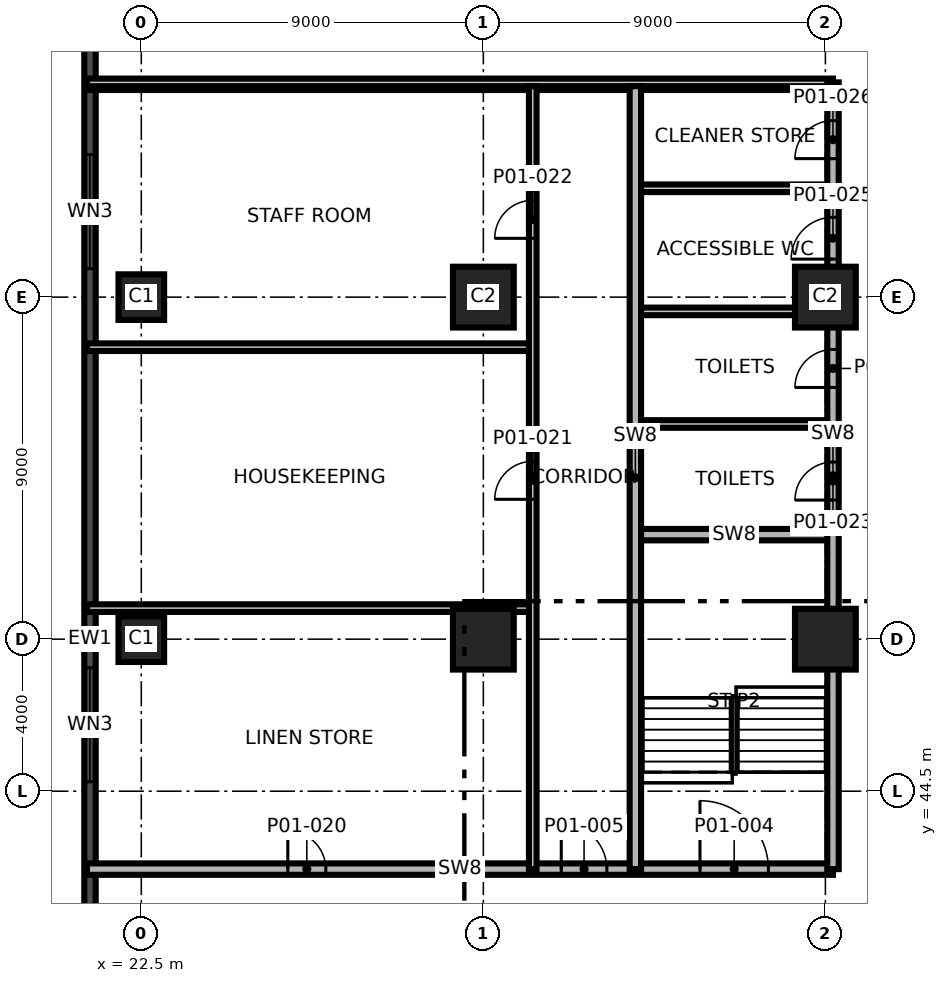
"""IFC4 building model, lengths in metres.
Left out: names, types, materials, properties, quantities, classifications, styles, units other than length and angle.
Written with IfcOpenShell. Run it as: python <this file> out.ifc"""

import sys

from ifc_helpers import new_model, si_unit, direction, frame, frame_2d, origin, origin_2d, place, context, subcontext, project, spatial, rectangle, extrude, element, fill, save


model = new_model("IFC4")
c1 = context("Model", 3, precision=1e-05, world=origin(), true_north=direction((0.0, 1.0)))
c2 = subcontext(c1, "Body", "Model", "MODEL_VIEW")
j1 = project(units=[si_unit("LENGTHUNIT", "METRE"), si_unit("PLANEANGLEUNIT", "RADIAN")], contexts=[c1])
p1 = place(None, origin())
s1 = spatial("IfcSite", under=j1, at=p1, CompositionType="ELEMENT")
p2 = place(p1, origin())
s2 = spatial("IfcBuilding", under=s1, at=p2, CompositionType="ELEMENT")
p3 = place(p2, frame((0.0, 0.0, 8.0)))
s3 = spatial("IfcBuildingStorey", under=s2, at=p3, CompositionType="ELEMENT", Elevation=8.0)
p4 = place(p3, frame((22.5, 48.5, 0.0), z_axis=(0.0, 0.0, 1.0), x_axis=(1.0, 0.0, 0.0)))
e1 = element("IfcColumn", 1, at=p4, inside=s3, PredefinedType="COLUMN", context=c2, shape_type="SweptSolid", body=[
    extrude(rectangle(XDim=1.2, YDim=1.2, at=origin_2d()), origin(), (0.0, 0.0, 1.0), 5.5),
])
for number, where, z_axis, x_axis in (
    (2, (31.5, 48.5, 0.0), (0.0, 0.0, 1.0), (1.0, 0.0, 0.0)),
    (3, (40.5, 48.5, 0.0), (0.0, 0.0, 1.0), (1.0, 0.0, 0.0)),
):
    element("IfcColumn", number, at=place(p3, frame(where, z_axis=z_axis, x_axis=x_axis)), inside=s3, PredefinedType="COLUMN", context=c2, shape_type="SweptSolid", body=[
        extrude(rectangle(XDim=1.6, YDim=1.6, at=origin_2d()), origin(), (0.0, 0.0, 1.0), 5.5),
    ])
p5 = place(p3, frame((22.5, 57.5, 0.0), z_axis=(0.0, 0.0, 1.0), x_axis=(1.0, 0.0, 0.0)))
e4 = element("IfcColumn", 4, at=p5, inside=s3, PredefinedType="COLUMN", context=c2, shape_type="SweptSolid", body=[
    extrude(rectangle(XDim=1.2, YDim=1.2, at=origin_2d()), origin(), (0.0, 0.0, 1.0), 5.5),
])
for number, where, z_axis, x_axis in (
    (5, (31.5, 57.5, 0.0), (0.0, 0.0, 1.0), (1.0, 0.0, 0.0)),
    (6, (40.5, 57.5, 0.0), (0.0, 0.0, 1.0), (1.0, 0.0, 0.0)),
):
    element("IfcColumn", number, at=place(p3, frame(where, z_axis=z_axis, x_axis=x_axis)), inside=s3, PredefinedType="COLUMN", context=c2, shape_type="SweptSolid", body=[
        extrude(rectangle(XDim=1.6, YDim=1.6, at=origin_2d()), origin(), (0.0, 0.0, 1.0), 5.5),
    ])
p6 = place(p3, frame((21.15, 79.952, 0.0), z_axis=(0.0, 0.0, 1.0), x_axis=(0.0, -1.0, 0.0)))
e7 = element("IfcWall", 7, at=p6, inside=s3, PredefinedType="SOLIDWALL", context=c2, shape_type="SweptSolid", body=[
    extrude(rectangle(XDim=62.88, YDim=0.3, at=frame_2d((31.44, 0.0))), origin(), (0.0, 0.0, 1.0), 5.2),
])
p7 = place(p6, frame((0.726, 0.0, 0.9)))
e8 = element("IfcOpeningElement", 8, at=p7, cuts=e7, PredefinedType="OPENING", context=c2, shape_type="SweptSolid", body=[
    extrude(rectangle(XDim=3.0, YDim=2.4, at=frame_2d((1.5, 1.2))), frame((0.0, 0.16, 0.0), z_axis=(0.0, -1.0, 0.0), x_axis=(1.0, 0.0, 0.0)), (0.0, 0.0, 1.0), 0.32),
])
p8 = place(p6, frame((5.202, 0.0, 0.9)))
e9 = element("IfcOpeningElement", 9, at=p8, cuts=e7, PredefinedType="OPENING", context=c2, shape_type="SweptSolid", body=[
    extrude(rectangle(XDim=3.0, YDim=2.4, at=frame_2d((1.5, 1.2))), frame((0.0, 0.16, 0.0), z_axis=(0.0, -1.0, 0.0), x_axis=(1.0, 0.0, 0.0)), (0.0, 0.0, 1.0), 0.32),
])
p9 = place(p6, frame((9.702, 0.0, 0.9)))
e10 = element("IfcOpeningElement", 10, at=p9, cuts=e7, PredefinedType="OPENING", context=c2, shape_type="SweptSolid", body=[
    extrude(rectangle(XDim=3.0, YDim=2.4, at=frame_2d((1.5, 1.2))), frame((0.0, 0.16, 0.0), z_axis=(0.0, -1.0, 0.0), x_axis=(1.0, 0.0, 0.0)), (0.0, 0.0, 1.0), 0.32),
])
p10 = place(p6, frame((18.702, 0.0, 0.9)))
e11 = element("IfcOpeningElement", 11, at=p10, cuts=e7, PredefinedType="OPENING", context=c2, shape_type="SweptSolid", body=[
    extrude(rectangle(XDim=3.0, YDim=2.4, at=frame_2d((1.5, 1.2))), frame((0.0, 0.16, 0.0), z_axis=(0.0, -1.0, 0.0), x_axis=(1.0, 0.0, 0.0)), (0.0, 0.0, 1.0), 0.32),
])
p11 = place(p6, frame((32.202, 0.0, 0.9)))
e12 = element("IfcOpeningElement", 12, at=p11, cuts=e7, PredefinedType="OPENING", context=c2, shape_type="SweptSolid", body=[
    extrude(rectangle(XDim=3.0, YDim=2.4, at=frame_2d((1.5, 1.2))), frame((0.0, 0.16, 0.0), z_axis=(0.0, -1.0, 0.0), x_axis=(1.0, 0.0, 0.0)), (0.0, 0.0, 1.0), 0.32),
])
p12 = place(p6, frame((41.202, 0.0, 0.9)))
e13 = element("IfcOpeningElement", 13, at=p12, cuts=e7, PredefinedType="OPENING", context=c2, shape_type="SweptSolid", body=[
    extrude(rectangle(XDim=3.0, YDim=2.4, at=frame_2d((1.5, 1.2))), frame((0.0, 0.16, 0.0), z_axis=(0.0, -1.0, 0.0), x_axis=(1.0, 0.0, 0.0)), (0.0, 0.0, 1.0), 0.32),
])
p13 = place(p6, frame((45.702, 0.0, 0.9)))
e14 = element("IfcOpeningElement", 14, at=p13, cuts=e7, PredefinedType="OPENING", context=c2, shape_type="SweptSolid", body=[
    extrude(rectangle(XDim=3.0, YDim=2.4, at=frame_2d((1.5, 1.2))), frame((0.0, 0.16, 0.0), z_axis=(0.0, -1.0, 0.0), x_axis=(1.0, 0.0, 0.0)), (0.0, 0.0, 1.0), 0.32),
])
p14 = place(p6, frame((50.202, 0.0, 0.9)))
e15 = element("IfcOpeningElement", 15, at=p14, cuts=e7, PredefinedType="OPENING", context=c2, shape_type="SweptSolid", body=[
    extrude(rectangle(XDim=3.0, YDim=2.4, at=frame_2d((1.5, 1.2))), frame((0.0, 0.16, 0.0), z_axis=(0.0, -1.0, 0.0), x_axis=(1.0, 0.0, 0.0)), (0.0, 0.0, 1.0), 0.32),
])
p15 = place(p6, frame((54.702, 0.0, 0.9)))
e16 = element("IfcOpeningElement", 16, at=p15, cuts=e7, PredefinedType="OPENING", context=c2, shape_type="SweptSolid", body=[
    extrude(rectangle(XDim=3.0, YDim=2.4, at=frame_2d((1.5, 1.2))), frame((0.0, 0.16, 0.0), z_axis=(0.0, -1.0, 0.0), x_axis=(1.0, 0.0, 0.0)), (0.0, 0.0, 1.0), 0.32),
])
p16 = place(p6, frame((59.226, 0.0, 0.9)))
e17 = element("IfcOpeningElement", 17, at=p16, cuts=e7, PredefinedType="OPENING", context=c2, shape_type="SweptSolid", body=[
    extrude(rectangle(XDim=3.0, YDim=2.4, at=frame_2d((1.5, 1.2))), frame((0.0, 0.16, 0.0), z_axis=(0.0, -1.0, 0.0), x_axis=(1.0, 0.0, 0.0)), (0.0, 0.0, 1.0), 0.32),
])
p17 = place(p3, frame((21.07, 42.45, 0.0), z_axis=(0.0, 0.0, 1.0), x_axis=(1.0, 0.0, 0.0)))
e18 = element("IfcWall", 18, at=p17, inside=s3, PredefinedType="SHEAR", context=c2, shape_type="SweptSolid", body=[
    extrude(rectangle(XDim=19.63, YDim=0.3, at=frame_2d((9.815, 0.0))), origin(), (0.0, 0.0, 1.0), 5.2),
])
p18 = place(p17, frame((16.13, 0.0, 0.0)))
e19 = element("IfcOpeningElement", 19, at=p18, cuts=e18, PredefinedType="OPENING", context=c2, shape_type="SweptSolid", body=[
    extrude(rectangle(XDim=1.8, YDim=2.1, at=frame_2d((0.9, 1.05))), frame((0.0, 0.16, 0.0), z_axis=(0.0, -1.0, 0.0), x_axis=(1.0, 0.0, 0.0)), (0.0, 0.0, 1.0), 0.32),
])
p19 = place(p17, frame((12.48, 0.0, 0.0)))
e20 = element("IfcOpeningElement", 20, at=p19, cuts=e18, PredefinedType="OPENING", context=c2, shape_type="SweptSolid", body=[
    extrude(rectangle(XDim=1.2, YDim=2.1, at=frame_2d((0.6, 1.05))), frame((0.0, 0.16, 0.0), z_axis=(0.0, -1.0, 0.0), x_axis=(1.0, 0.0, 0.0)), (0.0, 0.0, 1.0), 0.32),
])
p20 = place(p17, frame((5.285, 0.0, 0.0)))
e21 = element("IfcOpeningElement", 21, at=p20, cuts=e18, PredefinedType="OPENING", context=c2, shape_type="SweptSolid", body=[
    extrude(rectangle(XDim=1.0, YDim=2.1, at=frame_2d((0.5, 1.05))), frame((0.0, 0.16, 0.0), z_axis=(0.0, -1.0, 0.0), x_axis=(1.0, 0.0, 0.0)), (0.0, 0.0, 1.0), 0.32),
])
p21 = place(p3, frame((21.07, 49.317, 0.0), z_axis=(0.0, 0.0, 1.0), x_axis=(1.0, 0.0, 0.0)))
e22 = element("IfcWall", 22, at=p21, inside=s3, PredefinedType="PARTITIONING", context=c2, shape_type="SweptSolid", body=[
    extrude(rectangle(XDim=11.73, YDim=0.2, at=frame_2d((5.865, 0.0))), origin(), (0.0, 0.0, 1.0), 5.2),
])
p22 = place(p3, frame((35.5, 51.25, 0.0), z_axis=(0.0, 0.0, 1.0), x_axis=(1.0, 0.0, 0.0)))
e23 = element("IfcWall", 23, at=p22, inside=s3, PredefinedType="SHEAR", context=c2, shape_type="SweptSolid", body=[
    extrude(rectangle(XDim=5.2, YDim=0.3, at=frame_2d((2.6, 0.0))), origin(), (0.0, 0.0, 1.0), 5.2),
])
p23 = place(p3, frame((35.55, 54.162, 0.0), z_axis=(0.0, 0.0, 1.0), x_axis=(1.0, 0.0, 0.0)))
e24 = element("IfcWall", 24, at=p23, inside=s3, PredefinedType="PARTITIONING", context=c2, shape_type="SweptSolid", body=[
    extrude(rectangle(XDim=5.15, YDim=0.2, at=frame_2d((2.575, 0.0))), origin(), (0.0, 0.0, 1.0), 5.2),
])
p24 = place(p3, frame((21.07, 56.183, 0.0), z_axis=(0.0, 0.0, 1.0), x_axis=(1.0, 0.0, 0.0)))
e25 = element("IfcWall", 25, at=p24, inside=s3, PredefinedType="PARTITIONING", context=c2, shape_type="SweptSolid", body=[
    extrude(rectangle(XDim=11.73, YDim=0.2, at=frame_2d((5.865, 0.0))), origin(), (0.0, 0.0, 1.0), 5.2),
])
for number, where, z_axis, x_axis in (
    (26, (35.55, 57.125, 0.0), (0.0, 0.0, 1.0), (1.0, 0.0, 0.0)),
    (27, (35.55, 60.364, 0.0), (0.0, 0.0, 1.0), (1.0, 0.0, 0.0)),
):
    element("IfcWall", number, at=place(p3, frame(where, z_axis=z_axis, x_axis=x_axis)), inside=s3, PredefinedType="PARTITIONING", context=c2, shape_type="SweptSolid", body=[
        extrude(rectangle(XDim=5.15, YDim=0.2, at=frame_2d((2.575, 0.0))), origin(), (0.0, 0.0, 1.0), 5.2),
    ])
p25 = place(p3, frame((21.07, 63.05, 0.0), z_axis=(0.0, 0.0, 1.0), x_axis=(1.0, 0.0, 0.0)))
e28 = element("IfcWall", 28, at=p25, inside=s3, PredefinedType="PARTITIONING", context=c2, shape_type="SweptSolid", body=[
    extrude(rectangle(XDim=14.43, YDim=0.2, at=frame_2d((7.215, 0.0))), origin(), (0.0, 0.0, 1.0), 5.2),
])
p26 = place(p3, frame((35.55, 63.05, 0.0), z_axis=(0.0, 0.0, 1.0), x_axis=(1.0, 0.0, 0.0)))
e29 = element("IfcWall", 29, at=p26, inside=s3, PredefinedType="PARTITIONING", context=c2, shape_type="SweptSolid", body=[
    extrude(rectangle(XDim=5.15, YDim=0.2, at=frame_2d((2.575, 0.0))), origin(), (0.0, 0.0, 1.0), 5.2),
])
p27 = place(p3, frame((21.07, 63.15, 0.0), z_axis=(0.0, 0.0, 1.0), x_axis=(1.0, 0.0, 0.0)))
e30 = element("IfcWall", 30, at=p27, inside=s3, PredefinedType="PARTITIONING", context=c2, shape_type="SweptSolid", body=[
    extrude(rectangle(XDim=19.63, YDim=0.2, at=frame_2d((9.815, 0.0))), origin(), (0.0, 0.0, 1.0), 5.2),
])
p28 = place(p3, frame((32.8, 42.45, 0.0), z_axis=(0.0, 0.0, 1.0), x_axis=(0.0, 1.0, 0.0)))
e31 = element("IfcWall", 31, at=p28, inside=s3, PredefinedType="PARTITIONING", context=c2, shape_type="SweptSolid", body=[
    extrude(rectangle(XDim=20.6, YDim=0.2, at=frame_2d((10.3, 0.0))), origin(), (0.0, 0.0, 1.0), 5.2),
])
p29 = place(p28, frame((9.73, 0.0, 0.0)))
e32 = element("IfcOpeningElement", 32, at=p29, cuts=e31, PredefinedType="OPENING", context=c2, shape_type="SweptSolid", body=[
    extrude(rectangle(XDim=1.0, YDim=2.1, at=frame_2d((0.5, 1.05))), frame((0.0, 0.11, 0.0), z_axis=(0.0, -1.0, 0.0), x_axis=(1.0, 0.0, 0.0)), (0.0, 0.0, 1.0), 0.22),
])
p30 = place(p28, frame((16.597, 0.0, 0.0)))
e33 = element("IfcOpeningElement", 33, at=p30, cuts=e31, PredefinedType="OPENING", context=c2, shape_type="SweptSolid", body=[
    extrude(rectangle(XDim=1.0, YDim=2.1, at=frame_2d((0.5, 1.05))), frame((0.0, 0.11, 0.0), z_axis=(0.0, -1.0, 0.0), x_axis=(1.0, 0.0, 0.0)), (0.0, 0.0, 1.0), 0.22),
])
p31 = place(p3, frame((35.5, 42.45, 0.0), z_axis=(0.0, 0.0, 1.0), x_axis=(0.0, 1.0, 0.0)))
e34 = element("IfcWall", 34, at=p31, inside=s3, PredefinedType="SHEAR", context=c2, shape_type="SweptSolid", body=[
    extrude(rectangle(XDim=20.6, YDim=0.3, at=frame_2d((10.3, 0.0))), origin(), (0.0, 0.0, 1.0), 5.2),
])
p32 = place(p3, frame((40.7, 42.45, 0.0), z_axis=(0.0, 0.0, 1.0), x_axis=(0.0, 1.0, 0.0)))
e35 = element("IfcWall", 35, at=p32, inside=s3, PredefinedType="SHEAR", context=c2, shape_type="SweptSolid", body=[
    extrude(rectangle(XDim=20.7, YDim=0.3, at=frame_2d((10.35, 0.0))), origin(), (0.0, 0.0, 1.0), 5.2),
])
p33 = place(p32, frame((9.71, 0.0, 0.0)))
e36 = element("IfcOpeningElement", 36, at=p33, cuts=e35, PredefinedType="OPENING", context=c2, shape_type="SweptSolid", body=[
    extrude(rectangle(XDim=1.0, YDim=2.1, at=frame_2d((0.5, 1.05))), frame((0.0, 0.16, 0.0), z_axis=(0.0, -1.0, 0.0), x_axis=(1.0, 0.0, 0.0)), (0.0, 0.0, 1.0), 0.32),
])
p34 = place(p32, frame((12.673, 0.0, 0.0)))
e37 = element("IfcOpeningElement", 37, at=p34, cuts=e35, PredefinedType="OPENING", context=c2, shape_type="SweptSolid", body=[
    extrude(rectangle(XDim=1.0, YDim=2.1, at=frame_2d((0.5, 1.05))), frame((0.0, 0.16, 0.0), z_axis=(0.0, -1.0, 0.0), x_axis=(1.0, 0.0, 0.0)), (0.0, 0.0, 1.0), 0.32),
])
p35 = place(p32, frame((16.05, 0.0, 0.0)))
e38 = element("IfcOpeningElement", 38, at=p35, cuts=e35, PredefinedType="OPENING", context=c2, shape_type="SweptSolid", body=[
    extrude(rectangle(XDim=1.1, YDim=2.1, at=frame_2d((0.55, 1.05))), frame((0.0, 0.16, 0.0), z_axis=(0.0, -1.0, 0.0), x_axis=(1.0, 0.0, 0.0)), (0.0, 0.0, 1.0), 0.32),
])
p36 = place(p32, frame((18.694, 0.0, 0.0)))
e39 = element("IfcOpeningElement", 39, at=p36, cuts=e35, PredefinedType="OPENING", context=c2, shape_type="SweptSolid", body=[
    extrude(rectangle(XDim=1.0, YDim=2.1, at=frame_2d((0.5, 1.05))), frame((0.0, 0.16, 0.0), z_axis=(0.0, -1.0, 0.0), x_axis=(1.0, 0.0, 0.0)), (0.0, 0.0, 1.0), 0.32),
])
p37 = place(p10, origin())
e40 = element("IfcWindow", 40, at=p37, inside=s3, PartitioningType="SINGLE_PANEL", PredefinedType="WINDOW", context=c2, shape_type="SweptSolid", body=[
    extrude(rectangle(XDim=3.0, YDim=2.4, at=frame_2d((1.5, 1.2))), frame((0.0, 0.03, 0.0), z_axis=(0.0, -1.0, 0.0), x_axis=(1.0, 0.0, 0.0)), (0.0, 0.0, 1.0), 0.06),
])
fill(e11, e40)
p38 = place(p11, origin())
e41 = element("IfcWindow", 41, at=p38, inside=s3, PartitioningType="SINGLE_PANEL", PredefinedType="WINDOW", context=c2, shape_type="SweptSolid", body=[
    extrude(rectangle(XDim=3.0, YDim=2.4, at=frame_2d((1.5, 1.2))), frame((0.0, 0.03, 0.0), z_axis=(0.0, -1.0, 0.0), x_axis=(1.0, 0.0, 0.0)), (0.0, 0.0, 1.0), 0.06),
])
fill(e12, e41)
p39 = place(p18, origin())
e42 = element("IfcDoor", 42, at=p39, inside=s3, OperationType="SINGLE_SWING_RIGHT", PredefinedType="DOOR", context=c2, shape_type="SweptSolid", body=[
    extrude(rectangle(XDim=1.8, YDim=2.1, at=frame_2d((0.9, 1.05))), frame((0.0, 0.025, 0.0), z_axis=(0.0, -1.0, 0.0), x_axis=(1.0, 0.0, 0.0)), (0.0, 0.0, 1.0), 0.05),
])
fill(e19, e42)
p40 = place(p19, origin())
e43 = element("IfcDoor", 43, at=p40, inside=s3, OperationType="SINGLE_SWING_LEFT", PredefinedType="DOOR", context=c2, shape_type="SweptSolid", body=[
    extrude(rectangle(XDim=1.2, YDim=2.1, at=frame_2d((0.6, 1.05))), frame((0.0, 0.025, 0.0), z_axis=(0.0, -1.0, 0.0), x_axis=(1.0, 0.0, 0.0)), (0.0, 0.0, 1.0), 0.05),
])
fill(e20, e43)
p41 = place(p20, origin())
e44 = element("IfcDoor", 44, at=p41, inside=s3, OperationType="SINGLE_SWING_RIGHT", PredefinedType="DOOR", context=c2, shape_type="SweptSolid", body=[
    extrude(rectangle(XDim=1.0, YDim=2.1, at=frame_2d((0.5, 1.05))), frame((0.0, 0.025, 0.0), z_axis=(0.0, -1.0, 0.0), x_axis=(1.0, 0.0, 0.0)), (0.0, 0.0, 1.0), 0.05),
])
fill(e21, e44)
p42 = place(p29, origin())
e45 = element("IfcDoor", 45, at=p42, inside=s3, OperationType="SINGLE_SWING_LEFT", PredefinedType="DOOR", context=c2, shape_type="SweptSolid", body=[
    extrude(rectangle(XDim=1.0, YDim=2.1, at=frame_2d((0.5, 1.05))), frame((0.0, 0.025, 0.0), z_axis=(0.0, -1.0, 0.0), x_axis=(1.0, 0.0, 0.0)), (0.0, 0.0, 1.0), 0.05),
])
fill(e32, e45)
p43 = place(p30, origin())
e46 = element("IfcDoor", 46, at=p43, inside=s3, OperationType="SINGLE_SWING_RIGHT", PredefinedType="DOOR", context=c2, shape_type="SweptSolid", body=[
    extrude(rectangle(XDim=1.0, YDim=2.1, at=frame_2d((0.5, 1.05))), frame((0.0, 0.025, 0.0), z_axis=(0.0, -1.0, 0.0), x_axis=(1.0, 0.0, 0.0)), (0.0, 0.0, 1.0), 0.05),
])
fill(e33, e46)
p44 = place(p33, origin())
e47 = element("IfcDoor", 47, at=p44, inside=s3, OperationType="SINGLE_SWING_LEFT", PredefinedType="DOOR", context=c2, shape_type="SweptSolid", body=[
    extrude(rectangle(XDim=1.0, YDim=2.1, at=frame_2d((0.5, 1.05))), frame((0.0, 0.025, 0.0), z_axis=(0.0, -1.0, 0.0), x_axis=(1.0, 0.0, 0.0)), (0.0, 0.0, 1.0), 0.05),
])
fill(e36, e47)
p45 = place(p34, origin())
e48 = element("IfcDoor", 48, at=p45, inside=s3, OperationType="SINGLE_SWING_RIGHT", PredefinedType="DOOR", context=c2, shape_type="SweptSolid", body=[
    extrude(rectangle(XDim=1.0, YDim=2.1, at=frame_2d((0.5, 1.05))), frame((0.0, 0.025, 0.0), z_axis=(0.0, -1.0, 0.0), x_axis=(1.0, 0.0, 0.0)), (0.0, 0.0, 1.0), 0.05),
])
fill(e37, e48)
p46 = place(p35, origin())
e49 = element("IfcDoor", 49, at=p46, inside=s3, OperationType="SINGLE_SWING_LEFT", PredefinedType="DOOR", context=c2, shape_type="SweptSolid", body=[
    extrude(rectangle(XDim=1.1, YDim=2.1, at=frame_2d((0.55, 1.05))), frame((0.0, 0.025, 0.0), z_axis=(0.0, -1.0, 0.0), x_axis=(1.0, 0.0, 0.0)), (0.0, 0.0, 1.0), 0.05),
])
fill(e38, e49)
p47 = place(p36, origin())
e50 = element("IfcDoor", 50, at=p47, inside=s3, OperationType="SINGLE_SWING_RIGHT", PredefinedType="DOOR", context=c2, shape_type="SweptSolid", body=[
    extrude(rectangle(XDim=1.0, YDim=2.1, at=frame_2d((0.5, 1.05))), frame((0.0, 0.025, 0.0), z_axis=(0.0, -1.0, 0.0), x_axis=(1.0, 0.0, 0.0)), (0.0, 0.0, 1.0), 0.05),
])
fill(e39, e50)
save(model, sys.argv[1])
